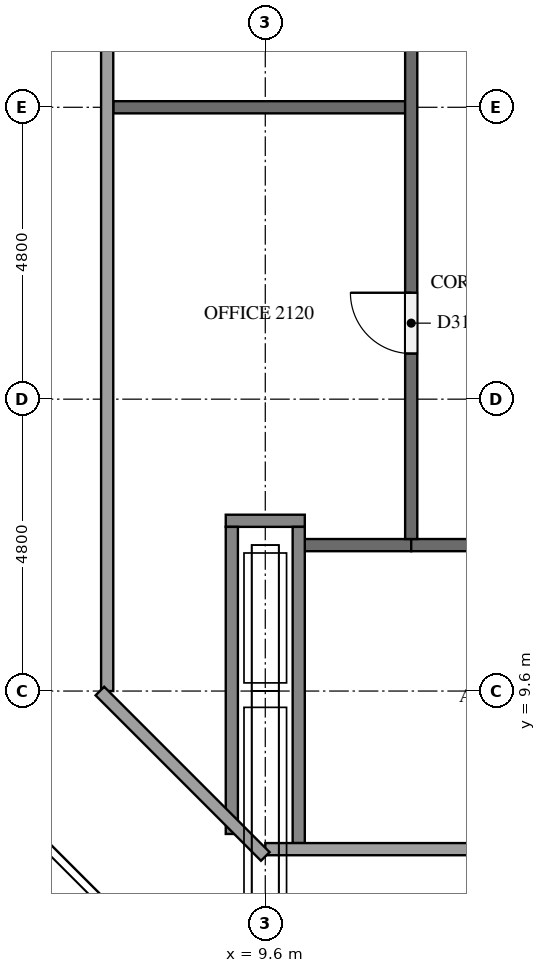
"""IFC4 building model, lengths in metres.
Left out: names, types, materials, properties, quantities, classifications, styles, units other than length and angle.
Written with IfcOpenShell. Run it as: python <this file> out.ifc"""

import sys

from ifc_helpers import new_model, si_unit, direction, frame, frame_2d, origin, place, context, subcontext, project, spatial, rectangle, extrude, element, fill, save


model = new_model("IFC4")
c1 = context("Model", 3, precision=1e-05, world=origin(), true_north=direction((0.0, 1.0)))
c2 = subcontext(c1, "Body", "Model", "MODEL_VIEW")
j1 = project(units=[si_unit("LENGTHUNIT", "METRE"), si_unit("PLANEANGLEUNIT", "RADIAN")], contexts=[c1])
p1 = place(None, origin())
s1 = spatial("IfcSite", under=j1, at=p1, CompositionType="ELEMENT")
p2 = place(p1, origin())
s2 = spatial("IfcBuilding", under=s1, at=p2, CompositionType="ELEMENT")
p3 = place(p2, frame((0.0, 0.0, 83.8)))
s3 = spatial("IfcBuildingStorey", under=s2, at=p3, CompositionType="ELEMENT", Elevation=83.8)
p4 = place(p3, frame((10.25, 12.0, 0.0), z_axis=(0.0, 0.0, 1.0), x_axis=(1.0, 0.0, 0.0)))
e1 = element("IfcWall", 1, at=p4, inside=s3, PredefinedType="PARTITIONING", context=c2, shape_type="SweptSolid", body=[
    extrude(rectangle(XDim=1.75, YDim=0.2, at=frame_2d((0.875, 0.0))), origin(), (0.0, 0.0, 1.0), 5.1),
])
p5 = place(p3, frame((18.75, 12.0, 0.0), z_axis=(0.0, 0.0, 1.0), x_axis=(-1.0, 0.0, 0.0)))
e2 = element("IfcWall", 2, at=p5, inside=s3, PredefinedType="PARTITIONING", context=c2, shape_type="SweptSolid", body=[
    extrude(rectangle(XDim=6.75, YDim=0.2, at=frame_2d((3.375, 0.0))), origin(), (0.0, 0.0, 1.0), 5.1),
])
p6 = place(p5, frame((2.85, 0.0, 0.0)))
e3 = element("IfcOpeningElement", 3, at=p6, cuts=e2, PredefinedType="OPENING", context=c2, shape_type="SweptSolid", body=[
    extrude(rectangle(XDim=1.0, YDim=2.1, at=frame_2d((0.5, 1.05))), frame((0.0, 0.11, 0.0), z_axis=(0.0, -1.0, 0.0), x_axis=(1.0, 0.0, 0.0)), (0.0, 0.0, 1.0), 0.22),
])
p7 = place(p3, frame((8.95, 12.4, 0.0), z_axis=(0.0, 0.0, 1.0), x_axis=(1.0, 0.0, 0.0)))
e4 = element("IfcWall", 4, at=p7, inside=s3, PredefinedType="PARTITIONING", context=c2, shape_type="SweptSolid", body=[
    extrude(rectangle(XDim=1.3, YDim=0.2, at=frame_2d((0.65, 0.0))), origin(), (0.0, 0.0, 1.0), 5.1),
])
p8 = place(p3, frame((7.1, 19.2, 0.0), z_axis=(0.0, 0.0, 1.0), x_axis=(1.0, 0.0, 0.0)))
e5 = element("IfcWall", 5, at=p8, inside=s3, PredefinedType="PARTITIONING", context=c2, shape_type="SweptSolid", body=[
    extrude(rectangle(XDim=4.8, YDim=0.2, at=frame_2d((2.4, 0.0))), origin(), (0.0, 0.0, 1.0), 5.1),
])
p9 = place(p3, frame((9.05, 7.25, 0.0), z_axis=(0.0, 0.0, 1.0), x_axis=(0.0, 1.0, 0.0)))
e6 = element("IfcWall", 6, at=p9, inside=s3, PredefinedType="PARTITIONING", context=c2, shape_type="SweptSolid", body=[
    extrude(rectangle(XDim=5.05, YDim=0.2, at=frame_2d((2.525, 0.0))), origin(), (0.0, 0.0, 1.0), 5.1),
])
p10 = place(p3, frame((10.15, 7.1, 0.0), z_axis=(0.0, 0.0, 1.0), x_axis=(0.0, 1.0, 0.0)))
e7 = element("IfcWall", 7, at=p10, inside=s3, PredefinedType="PARTITIONING", context=c2, shape_type="SweptSolid", body=[
    extrude(rectangle(XDim=5.2, YDim=0.2, at=frame_2d((2.6, 0.0))), origin(), (0.0, 0.0, 1.0), 5.1),
])
p11 = place(p3, frame((12.0, 12.1, 0.0), z_axis=(0.0, 0.0, 1.0), x_axis=(0.0, 1.0, 0.0)))
e8 = element("IfcWall", 8, at=p11, inside=s3, PredefinedType="PARTITIONING", context=c2, shape_type="SweptSolid", body=[
    extrude(rectangle(XDim=28.6, YDim=0.2, at=frame_2d((14.3, 0.0))), origin(), (0.0, 0.0, 1.0), 5.1),
])
p12 = place(p11, frame((3.05, 0.0, 0.0)))
e9 = element("IfcOpeningElement", 9, at=p12, cuts=e8, PredefinedType="OPENING", context=c2, shape_type="SweptSolid", body=[
    extrude(rectangle(XDim=1.0, YDim=2.1, at=frame_2d((0.5, 1.05))), frame((0.0, 0.11, 0.0), z_axis=(0.0, -1.0, 0.0), x_axis=(1.0, 0.0, 0.0)), (0.0, 0.0, 1.0), 0.22),
])
p13 = place(p11, frame((9.05, 0.0, 0.0)))
e10 = element("IfcOpeningElement", 10, at=p13, cuts=e8, PredefinedType="OPENING", context=c2, shape_type="SweptSolid", body=[
    extrude(rectangle(XDim=1.0, YDim=2.1, at=frame_2d((0.5, 1.05))), frame((0.0, 0.11, 0.0), z_axis=(0.0, -1.0, 0.0), x_axis=(1.0, 0.0, 0.0)), (0.0, 0.0, 1.0), 0.22),
])
p14 = place(p11, frame((13.85, 0.0, 0.0)))
e11 = element("IfcOpeningElement", 11, at=p14, cuts=e8, PredefinedType="OPENING", context=c2, shape_type="SweptSolid", body=[
    extrude(rectangle(XDim=1.0, YDim=2.1, at=frame_2d((0.5, 1.05))), frame((0.0, 0.11, 0.0), z_axis=(0.0, -1.0, 0.0), x_axis=(1.0, 0.0, 0.0)), (0.0, 0.0, 1.0), 0.22),
])
p15 = place(p11, frame((18.65, 0.0, 0.0)))
e12 = element("IfcOpeningElement", 12, at=p15, cuts=e8, PredefinedType="OPENING", context=c2, shape_type="SweptSolid", body=[
    extrude(rectangle(XDim=1.0, YDim=2.1, at=frame_2d((0.5, 1.05))), frame((0.0, 0.11, 0.0), z_axis=(0.0, -1.0, 0.0), x_axis=(1.0, 0.0, 0.0)), (0.0, 0.0, 1.0), 0.22),
])
p16 = place(p11, frame((24.55, 0.0, 0.0)))
e13 = element("IfcOpeningElement", 13, at=p16, cuts=e8, PredefinedType="OPENING", context=c2, shape_type="SweptSolid", body=[
    extrude(rectangle(XDim=1.0, YDim=2.1, at=frame_2d((0.5, 1.05))), frame((0.0, 0.11, 0.0), z_axis=(0.0, -1.0, 0.0), x_axis=(1.0, 0.0, 0.0)), (0.0, 0.0, 1.0), 0.22),
])
p17 = place(p12, origin())
e14 = element("IfcDoor", 14, at=p17, inside=s3, OperationType="SINGLE_SWING_RIGHT", PredefinedType="DOOR", context=c2, shape_type="SweptSolid", body=[
    extrude(rectangle(XDim=1.0, YDim=2.1, at=frame_2d((0.5, 1.05))), frame((0.0, 0.025, 0.0), z_axis=(0.0, -1.0, 0.0), x_axis=(1.0, 0.0, 0.0)), (0.0, 0.0, 1.0), 0.05),
])
fill(e9, e14)
save(model, sys.argv[1])
